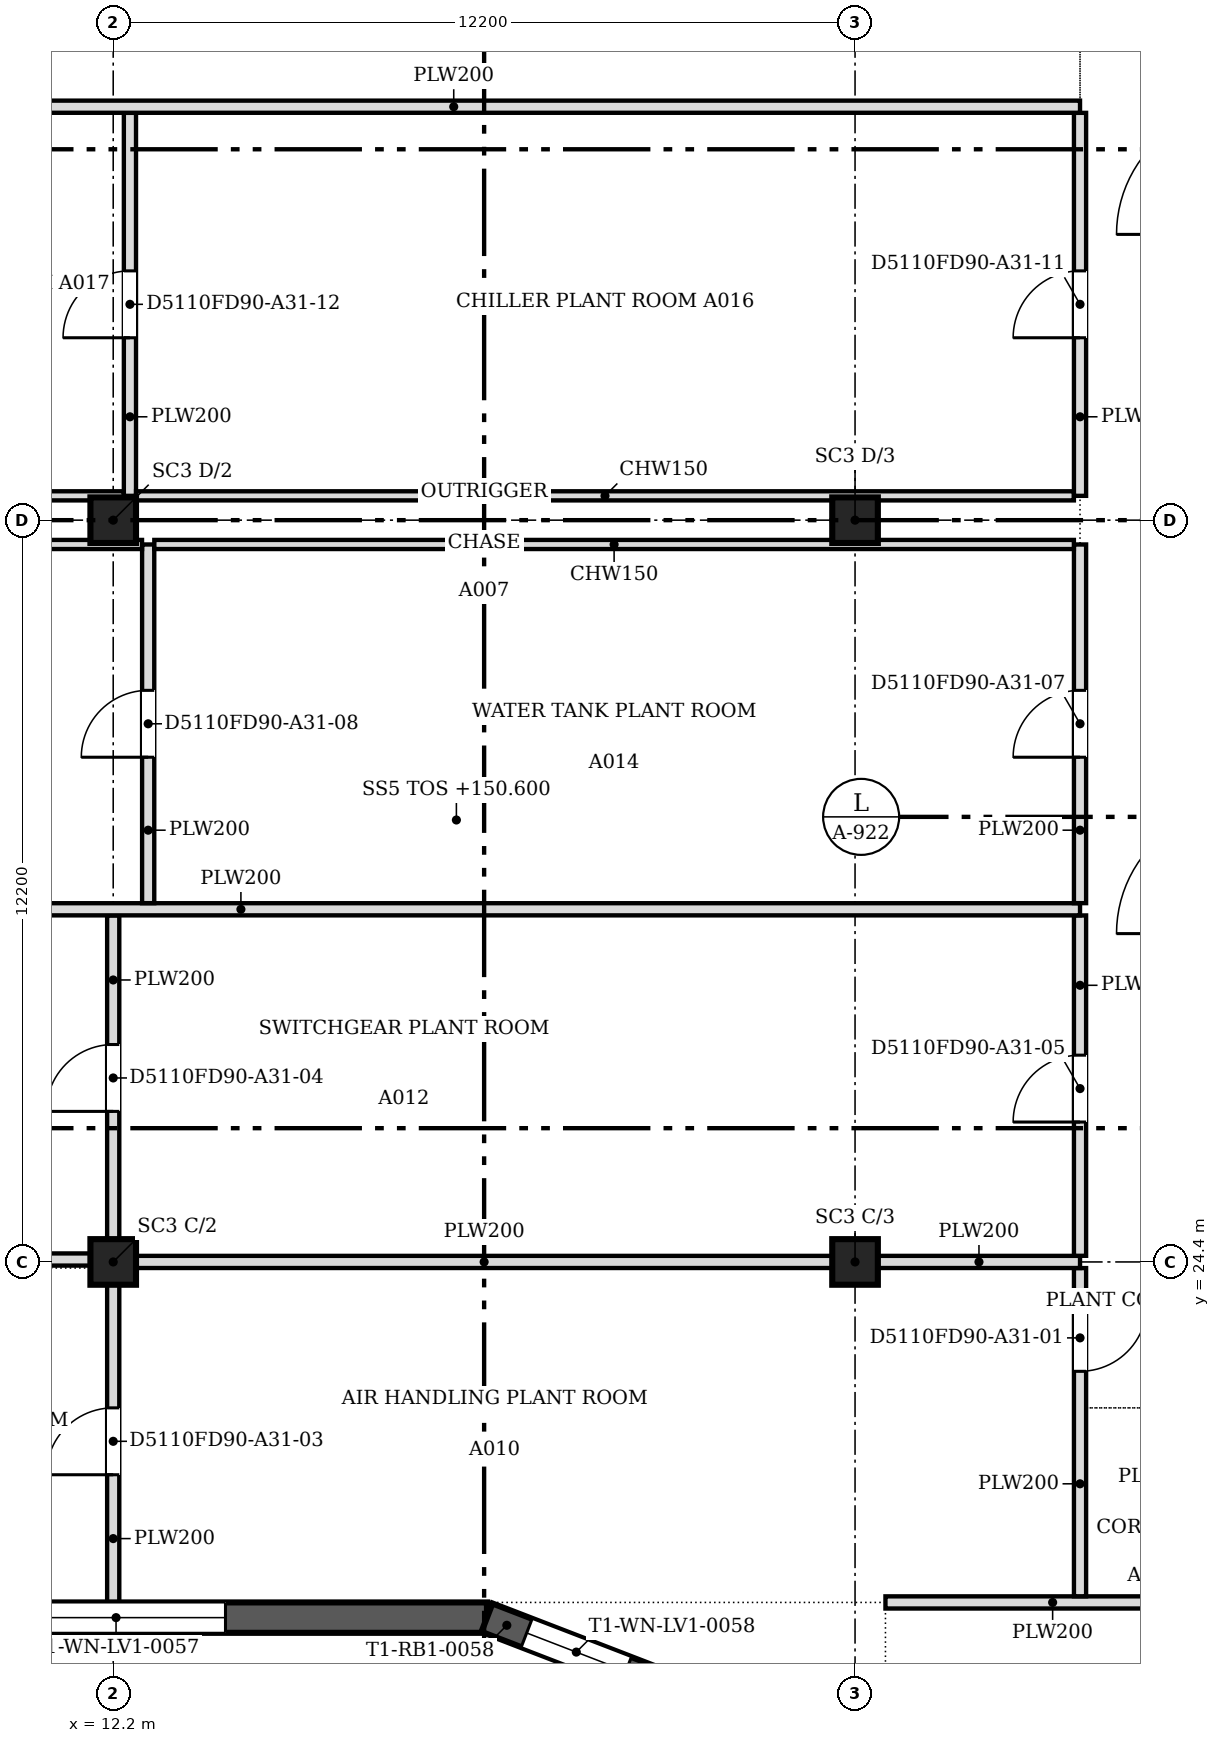
"""IFC4 building model, lengths in metres.
Left out: names, types, materials, properties, quantities, classifications, styles, units other than length and angle.
Written with IfcOpenShell. Run it as: python <this file> out.ifc"""

import sys

from ifc_helpers import new_model, si_unit, direction, frame, frame_2d, origin, origin_2d, place, context, subcontext, project, spatial, polyline, rectangle, outline, extrude, faceted_brep, source, transform, mapped, element, fill, save


model = new_model("IFC4")
c1 = context("Model", 3, precision=1e-05, world=origin(), true_north=direction((0.0, 1.0)))
c2 = subcontext(c1, "Body", "Model", "MODEL_VIEW")
j1 = project(units=[si_unit("LENGTHUNIT", "METRE"), si_unit("PLANEANGLEUNIT", "RADIAN")], contexts=[c1])
p1 = place(None, origin())
s1 = spatial("IfcSite", under=j1, at=p1, CompositionType="ELEMENT")
p2 = place(p1, origin())
s2 = spatial("IfcBuilding", under=s1, at=p2, CompositionType="ELEMENT")
p3 = place(p2, frame((0.0, 0.0, 150.6)))
s3 = spatial("IfcBuildingStorey", under=s2, at=p3, CompositionType="ELEMENT", Elevation=150.6)
for number, where, z_axis, x_axis in (
    (1, (12.2, 24.4, 0.0), (0.0, 0.0, 1.0), (1.0, 0.0, 0.0)),
    (2, (12.2, 36.6, 0.0), (0.0, 0.0, 1.0), (1.0, 0.0, 0.0)),
    (3, (24.4, 24.4, 0.0), (0.0, 0.0, 1.0), (1.0, 0.0, 0.0)),
    (4, (24.4, 36.6, 0.0), (0.0, 0.0, 1.0), (1.0, 0.0, 0.0)),
):
    element("IfcColumn", number, at=place(p3, frame(where, z_axis=z_axis, x_axis=x_axis)), inside=s3, PredefinedType="COLUMN", context=c2, shape_type="SweptSolid", body=[
        extrude(rectangle(XDim=0.75, YDim=0.75, at=origin_2d()), origin(), (0.0, 0.0, 1.0), 4.6),
    ])
m1 = source(origin(), c2, "Body", "Brep", [
    faceted_brep([(0.0, -0.25, 0.0), (12.154, -0.25, 0.0), (12.154, -0.25, 4.8), (0.0, -0.25, 4.8), (0.047, 0.25, 4.8), (12.2, 0.25, 4.8), (12.2, 0.25, 0.0), (0.047, 0.25, 0.0), (12.2, -0.0, 0.0), (0.0, 0.0, 0.0), (12.2, -0.0, 4.8), (0.0, 0.0, 4.8)], [[[0, 1, 2, 3]], [[4, 5, 6, 7]], [[7, 6, 8, 1, 0, 9]], [[6, 5, 10, 8]], [[5, 4, 11, 3, 2, 10]], [[9, 0, 3, 11]], [[7, 9, 11, 4]], [[1, 8, 10, 2]]]),
])
p4 = place(p3, frame((6.146, 18.55, 0.0), z_axis=(0.0, 0.0, 1.0), x_axis=(1.0, 0.0, 0.0)))
e5 = element("IfcWall", 5, at=p4, inside=s3, PredefinedType="SOLIDWALL", context=c2, shape_type="MappedRepresentation", body=[
    mapped(m1, transform((0.0, 0.0, 0.0), scale=1.0)),
])
m2 = source(origin(), c2, "Body", "SweptSolid", [
    extrude(outline(polyline([(4.3, 0.8), (7.9, 0.8), (7.9, 4.0), (4.3, 4.0), (4.3, 0.8)])), frame((0.0, 0.26, 0.0), z_axis=(0.0, -1.0, 0.0), x_axis=(1.0, 0.0, 0.0)), (0.0, 0.0, 1.0), 0.52),
])
p5 = place(p4, origin())
e6 = element("IfcOpeningElement", 6, at=p5, cuts=e5, PredefinedType="OPENING", context=c2, shape_type="MappedRepresentation", body=[
    mapped(m2, transform((0.0, 0.0, 0.0), scale=1.0)),
])
m3 = source(origin(), c2, "Body", "Brep", [
    faceted_brep([(0.047, -0.25, 0.0), (3.096, -0.25, 0.0), (3.096, -0.25, 4.8), (0.047, -0.25, 4.8), (0.0, 0.25, 4.8), (3.149, 0.25, 4.8), (3.149, 0.25, 0.0), (0.0, 0.25, 0.0), (3.149, -0.0, 0.0), (0.0, 0.0, 0.0), (3.149, -0.0, 4.8), (0.0, 0.0, 4.8)], [[[0, 1, 2, 3]], [[4, 5, 6, 7]], [[7, 6, 8, 1, 0, 9]], [[6, 5, 10, 8]], [[5, 4, 11, 3, 2, 10]], [[4, 7, 9, 11]], [[9, 0, 3, 11]], [[1, 8, 10, 2]]]),
])
p6 = place(p3, frame((18.346, 18.55, 0.0), z_axis=(0.0, 0.0, 1.0), x_axis=(0.932987528699, -0.35990869855, 0.0)))
e7 = element("IfcWall", 7, at=p6, inside=s3, PredefinedType="SOLIDWALL", context=c2, shape_type="MappedRepresentation", body=[
    mapped(m3, transform((0.0, 0.0, 0.0), scale=1.0)),
])
m4 = source(origin(), c2, "Body", "SweptSolid", [
    extrude(outline(polyline([(0.7, 0.8), (2.449, 0.8), (2.449, 4.0), (0.7, 4.0), (0.7, 0.8)])), frame((0.0, 0.26, 0.0), z_axis=(0.0, -1.0, 0.0), x_axis=(1.0, 0.0, 0.0)), (0.0, 0.0, 1.0), 0.52),
])
p7 = place(p6, origin())
e8 = element("IfcOpeningElement", 8, at=p7, cuts=e7, PredefinedType="OPENING", context=c2, shape_type="MappedRepresentation", body=[
    mapped(m4, transform((0.0, 0.0, 0.0), scale=1.0)),
])
p8 = place(p3, frame((12.2, 18.8, 0.0), z_axis=(0.0, 0.0, 1.0), x_axis=(0.0, 1.0, 0.0)))
e9 = element("IfcWall", 9, at=p8, inside=s3, PredefinedType="PARTITIONING", context=c2, shape_type="SweptSolid", body=[
    extrude(rectangle(XDim=5.224, YDim=0.2, at=frame_2d((2.612, 0.0))), origin(), (0.0, 0.0, 1.0), 4.067),
])
m5 = source(origin(), c2, "Body", "SweptSolid", [
    extrude(rectangle(XDim=1.1, YDim=2.1, at=frame_2d((0.55, 1.05))), frame((0.0, 0.11, 0.0), z_axis=(0.0, -1.0, 0.0), x_axis=(1.0, 0.0, 0.0)), (0.0, 0.0, 1.0), 0.22),
])
p9 = place(p8, frame((2.1, 0.0, 0.0)))
e10 = element("IfcOpeningElement", 10, at=p9, cuts=e9, PredefinedType="OPENING", context=c2, shape_type="MappedRepresentation", body=[
    mapped(m5, transform((0.0, 0.0, 0.0), scale=1.0)),
])
p10 = place(p3, frame((24.9, 18.8, 0.0), z_axis=(0.0, 0.0, 1.0), x_axis=(1.0, 0.0, 0.0)))
e11 = element("IfcWall", 11, at=p10, inside=s3, PredefinedType="PARTITIONING", context=c2, shape_type="SweptSolid", body=[
    extrude(rectangle(XDim=5.499, YDim=0.2, at=frame_2d((2.75, 0.0))), origin(), (0.0, 0.0, 1.0), 4.067),
])
p11 = place(p3, frame((28.1, 18.901, 0.0), z_axis=(0.0, 0.0, 1.0), x_axis=(0.0, 1.0, 0.0)))
e12 = element("IfcWall", 12, at=p11, inside=s3, PredefinedType="PARTITIONING", context=c2, shape_type="SweptSolid", body=[
    extrude(rectangle(XDim=5.398, YDim=0.2, at=frame_2d((2.699, 0.0))), origin(), (0.0, 0.0, 1.0), 4.067),
])
p12 = place(p11, frame((3.7, 0.0, 0.0)))
e13 = element("IfcOpeningElement", 13, at=p12, cuts=e12, PredefinedType="OPENING", context=c2, shape_type="MappedRepresentation", body=[
    mapped(m5, transform((0.0, 0.0, 0.0), scale=1.0)),
])
p13 = place(p3, frame((0.536, 24.44, 0.0), z_axis=(0.0, 0.0, 1.0), x_axis=(1.0, 0.0, 0.0)))
e14 = element("IfcWall", 14, at=p13, inside=s3, PredefinedType="PARTITIONING", context=c2, shape_type="SweptSolid", body=[
    extrude(rectangle(XDim=11.288, YDim=0.2, at=frame_2d((5.644, 0.0))), origin(), (0.0, 0.0, 1.0), 4.067),
])
p14 = place(p3, frame((12.576, 24.4, 0.0), z_axis=(0.0, 0.0, 1.0), x_axis=(1.0, 0.0, 0.0)))
e15 = element("IfcWall", 15, at=p14, inside=s3, PredefinedType="PARTITIONING", context=c2, shape_type="SweptSolid", body=[
    extrude(rectangle(XDim=11.448, YDim=0.2, at=frame_2d((5.724, 0.0))), origin(), (0.0, 0.0, 1.0), 4.067),
])
p15 = place(p3, frame((24.776, 24.4, 0.0), z_axis=(0.0, 0.0, 1.0), x_axis=(1.0, 0.0, 0.0)))
e16 = element("IfcWall", 16, at=p15, inside=s3, PredefinedType="PARTITIONING", context=c2, shape_type="SweptSolid", body=[
    extrude(rectangle(XDim=3.324, YDim=0.2, at=frame_2d((1.662, 0.0))), origin(), (0.0, 0.0, 1.0), 4.067),
])
p16 = place(p3, frame((28.1, 24.501, 0.0), z_axis=(0.0, 0.0, 1.0), x_axis=(0.0, 1.0, 0.0)))
e17 = element("IfcWall", 17, at=p16, inside=s3, PredefinedType="PARTITIONING", context=c2, shape_type="SweptSolid", body=[
    extrude(rectangle(XDim=5.598, YDim=0.2, at=frame_2d((2.799, 0.0))), origin(), (0.0, 0.0, 1.0), 4.067),
])
p17 = place(p16, frame((2.2, 0.0, 0.0)))
e18 = element("IfcOpeningElement", 18, at=p17, cuts=e17, PredefinedType="OPENING", context=c2, shape_type="MappedRepresentation", body=[
    mapped(m5, transform((0.0, 0.0, 0.0), scale=1.0)),
])
p18 = place(p3, frame((12.2, 24.776, 0.0), z_axis=(0.0, 0.0, 1.0), x_axis=(0.0, 1.0, 0.0)))
e19 = element("IfcWall", 19, at=p18, inside=s3, PredefinedType="PARTITIONING", context=c2, shape_type="SweptSolid", body=[
    extrude(rectangle(XDim=5.323, YDim=0.2, at=frame_2d((2.662, 0.0))), origin(), (0.0, 0.0, 1.0), 4.067),
])
p19 = place(p18, frame((2.1, 0.0, 0.0)))
e20 = element("IfcOpeningElement", 20, at=p19, cuts=e19, PredefinedType="OPENING", context=c2, shape_type="MappedRepresentation", body=[
    mapped(m5, transform((0.0, 0.0, 0.0), scale=1.0)),
])
p20 = place(p3, frame((0.5, 30.2, 0.0), z_axis=(0.0, 0.0, 1.0), x_axis=(1.0, 0.0, 0.0)))
e21 = element("IfcWall", 21, at=p20, inside=s3, PredefinedType="PARTITIONING", context=c2, shape_type="SweptSolid", body=[
    extrude(rectangle(XDim=27.6, YDim=0.2, at=frame_2d((13.8, 0.0))), origin(), (0.0, 0.0, 1.0), 4.067),
])
p21 = place(p3, frame((12.775, 30.301, 0.0), z_axis=(0.0, 0.0, 1.0), x_axis=(0.0, 1.0, 0.0)))
e22 = element("IfcWall", 22, at=p21, inside=s3, PredefinedType="PARTITIONING", context=c2, shape_type="SweptSolid", body=[
    extrude(rectangle(XDim=5.899, YDim=0.2, at=frame_2d((2.949, 0.0))), origin(), (0.0, 0.0, 1.0), 4.067),
])
p22 = place(p21, frame((2.4, 0.0, 0.0)))
e23 = element("IfcOpeningElement", 23, at=p22, cuts=e22, PredefinedType="OPENING", context=c2, shape_type="MappedRepresentation", body=[
    mapped(m5, transform((0.0, 0.0, 0.0), scale=1.0)),
])
p23 = place(p3, frame((28.1, 30.301, 0.0), z_axis=(0.0, 0.0, 1.0), x_axis=(0.0, 1.0, 0.0)))
e24 = element("IfcWall", 24, at=p23, inside=s3, PredefinedType="PARTITIONING", context=c2, shape_type="SweptSolid", body=[
    extrude(rectangle(XDim=5.899, YDim=0.2, at=frame_2d((2.949, 0.0))), origin(), (0.0, 0.0, 1.0), 4.067),
])
p24 = place(p23, frame((2.4, 0.0, 0.0)))
e25 = element("IfcOpeningElement", 25, at=p24, cuts=e24, PredefinedType="OPENING", context=c2, shape_type="MappedRepresentation", body=[
    mapped(m5, transform((0.0, 0.0, 0.0), scale=1.0)),
])
p25 = place(p3, frame((0.5, 36.2, 0.0), z_axis=(0.0, 0.0, 1.0), x_axis=(1.0, 0.0, 0.0)))
e26 = element("IfcWall", 26, at=p25, inside=s3, PredefinedType="PARTITIONING", context=c2, shape_type="SweptSolid", body=[
    extrude(rectangle(XDim=12.174, YDim=0.15, at=frame_2d((6.087, 0.0))), origin(), (0.0, 0.0, 1.0), 4.067),
])
p26 = place(p3, frame((12.876, 36.2, 0.0), z_axis=(0.0, 0.0, 1.0), x_axis=(1.0, 0.0, 0.0)))
e27 = element("IfcWall", 27, at=p26, inside=s3, PredefinedType="PARTITIONING", context=c2, shape_type="SweptSolid", body=[
    extrude(rectangle(XDim=15.123, YDim=0.15, at=frame_2d((7.562, 0.0))), origin(), (0.0, 0.0, 1.0), 4.067),
])
p27 = place(p3, frame((0.5, 37.0, 0.0), z_axis=(0.0, 0.0, 1.0), x_axis=(1.0, 0.0, 0.0)))
e28 = element("IfcWall", 28, at=p27, inside=s3, PredefinedType="PARTITIONING", context=c2, shape_type="SweptSolid", body=[
    extrude(rectangle(XDim=11.874, YDim=0.15, at=frame_2d((5.937, 0.0))), origin(), (0.0, 0.0, 1.0), 4.067),
])
p28 = place(p3, frame((12.475, 37.0, 0.0), z_axis=(0.0, 0.0, 1.0), x_axis=(0.0, 1.0, 0.0)))
e29 = element("IfcWall", 29, at=p28, inside=s3, PredefinedType="PARTITIONING", context=c2, shape_type="SweptSolid", body=[
    extrude(rectangle(XDim=6.299, YDim=0.2, at=frame_2d((3.149, 0.0))), origin(), (0.0, 0.0, 1.0), 4.067),
])
p29 = place(p28, frame((2.6, 0.0, 0.0)))
e30 = element("IfcOpeningElement", 30, at=p29, cuts=e29, PredefinedType="OPENING", context=c2, shape_type="MappedRepresentation", body=[
    mapped(m5, transform((0.0, 0.0, 0.0), scale=1.0)),
])
p30 = place(p3, frame((12.576, 37.0, 0.0), z_axis=(0.0, 0.0, 1.0), x_axis=(1.0, 0.0, 0.0)))
e31 = element("IfcWall", 31, at=p30, inside=s3, PredefinedType="PARTITIONING", context=c2, shape_type="SweptSolid", body=[
    extrude(rectangle(XDim=15.423, YDim=0.15, at=frame_2d((7.711, 0.0))), origin(), (0.0, 0.0, 1.0), 4.067),
])
p31 = place(p3, frame((28.1, 37.0, 0.0), z_axis=(0.0, 0.0, 1.0), x_axis=(0.0, 1.0, 0.0)))
e32 = element("IfcWall", 32, at=p31, inside=s3, PredefinedType="PARTITIONING", context=c2, shape_type="SweptSolid", body=[
    extrude(rectangle(XDim=6.299, YDim=0.2, at=frame_2d((3.149, 0.0))), origin(), (0.0, 0.0, 1.0), 4.067),
])
p32 = place(p31, frame((2.6, 0.0, 0.0)))
e33 = element("IfcOpeningElement", 33, at=p32, cuts=e32, PredefinedType="OPENING", context=c2, shape_type="MappedRepresentation", body=[
    mapped(m5, transform((0.0, 0.0, 0.0), scale=1.0)),
])
p33 = place(p3, frame((7.5, 43.4, 0.0), z_axis=(0.0, 0.0, 1.0), x_axis=(1.0, 0.0, 0.0)))
e34 = element("IfcWall", 34, at=p33, inside=s3, PredefinedType="PARTITIONING", context=c2, shape_type="SweptSolid", body=[
    extrude(rectangle(XDim=20.6, YDim=0.2, at=frame_2d((10.3, 0.0))), origin(), (0.0, 0.0, 1.0), 4.067),
])
m6 = source(origin(), c2, "Body", "SweptSolid", [
    extrude(outline(polyline([(4.3, 0.8), (7.9, 0.8), (7.9, 4.0), (4.3, 4.0), (4.3, 0.8)])), frame((0.0, 0.03, 0.0), z_axis=(0.0, -1.0, 0.0), x_axis=(1.0, 0.0, 0.0)), (0.0, 0.0, 1.0), 0.06),
])
p34 = place(p5, origin())
e35 = element("IfcWindow", 35, at=p34, inside=s3, PartitioningType="USERDEFINED", PredefinedType="WINDOW", context=c2, shape_type="MappedRepresentation", body=[
    mapped(m6, transform((0.0, 0.0, 0.0), scale=1.0)),
])
fill(e6, e35)
m7 = source(origin(), c2, "Body", "SweptSolid", [
    extrude(outline(polyline([(0.7, 0.8), (2.449, 0.8), (2.449, 4.0), (0.7, 4.0), (0.7, 0.8)])), frame((0.0, 0.03, 0.0), z_axis=(0.0, -1.0, 0.0), x_axis=(1.0, 0.0, 0.0)), (0.0, 0.0, 1.0), 0.06),
])
p35 = place(p7, origin())
e36 = element("IfcWindow", 36, at=p35, inside=s3, PartitioningType="USERDEFINED", PredefinedType="WINDOW", context=c2, shape_type="MappedRepresentation", body=[
    mapped(m7, transform((0.0, 0.0, 0.0), scale=1.0)),
])
fill(e8, e36)
m8 = source(origin(), c2, "Body", "SweptSolid", [
    extrude(rectangle(XDim=1.1, YDim=2.1, at=frame_2d((0.55, 1.05))), frame((0.0, 0.025, 0.0), z_axis=(0.0, -1.0, 0.0), x_axis=(1.0, 0.0, 0.0)), (0.0, 0.0, 1.0), 0.05),
])
p36 = place(p12, origin())
e37 = element("IfcDoor", 37, at=p36, inside=s3, OperationType="SINGLE_SWING_RIGHT", PredefinedType="DOOR", context=c2, shape_type="MappedRepresentation", body=[
    mapped(m8, transform((0.0, 0.0, 0.0), scale=1.0)),
])
fill(e13, e37)
p37 = place(p9, origin())
e38 = element("IfcDoor", 38, at=p37, inside=s3, OperationType="SINGLE_SWING_LEFT", PredefinedType="DOOR", context=c2, shape_type="MappedRepresentation", body=[
    mapped(m8, transform((0.0, 0.0, 0.0), scale=1.0)),
])
fill(e10, e38)
p38 = place(p19, origin())
e39 = element("IfcDoor", 39, at=p38, inside=s3, OperationType="SINGLE_SWING_LEFT", PredefinedType="DOOR", context=c2, shape_type="MappedRepresentation", body=[
    mapped(m8, transform((0.0, 0.0, 0.0), scale=1.0)),
])
fill(e20, e39)
p39 = place(p17, origin())
e40 = element("IfcDoor", 40, at=p39, inside=s3, OperationType="SINGLE_SWING_LEFT", PredefinedType="DOOR", context=c2, shape_type="MappedRepresentation", body=[
    mapped(m8, transform((0.0, 0.0, 0.0), scale=1.0)),
])
fill(e18, e40)
p40 = place(p24, origin())
e41 = element("IfcDoor", 41, at=p40, inside=s3, OperationType="SINGLE_SWING_LEFT", PredefinedType="DOOR", context=c2, shape_type="MappedRepresentation", body=[
    mapped(m8, transform((0.0, 0.0, 0.0), scale=1.0)),
])
fill(e25, e41)
p41 = place(p22, origin())
e42 = element("IfcDoor", 42, at=p41, inside=s3, OperationType="SINGLE_SWING_LEFT", PredefinedType="DOOR", context=c2, shape_type="MappedRepresentation", body=[
    mapped(m8, transform((0.0, 0.0, 0.0), scale=1.0)),
])
fill(e23, e42)
p42 = place(p32, origin())
e43 = element("IfcDoor", 43, at=p42, inside=s3, OperationType="SINGLE_SWING_LEFT", PredefinedType="DOOR", context=c2, shape_type="MappedRepresentation", body=[
    mapped(m8, transform((0.0, 0.0, 0.0), scale=1.0)),
])
fill(e33, e43)
p43 = place(p29, origin())
e44 = element("IfcDoor", 44, at=p43, inside=s3, OperationType="SINGLE_SWING_LEFT", PredefinedType="DOOR", context=c2, shape_type="MappedRepresentation", body=[
    mapped(m8, transform((0.0, 0.0, 0.0), scale=1.0)),
])
fill(e30, e44)
save(model, sys.argv[1])
